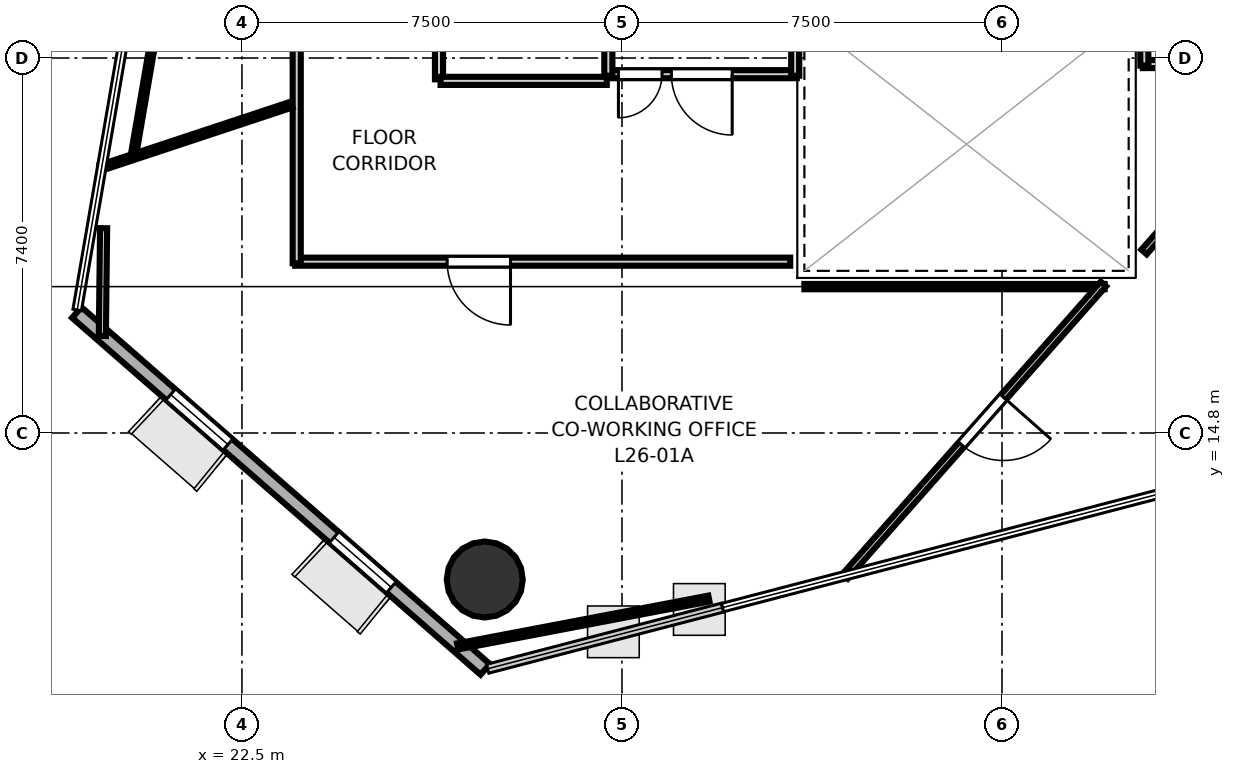
"""IFC4 building model, lengths in metres.
Left out: names, types, materials, properties, quantities, classifications, styles, units other than length and angle.
Written with IfcOpenShell. Run it as: python <this file> out.ifc"""

import sys

from ifc_helpers import new_model, si_unit, direction, frame, frame_2d, origin, origin_2d, place, context, subcontext, project, spatial, rectangle, hollow_circle, extrude, element, fill, save


model = new_model("IFC4")
c1 = context("Model", 3, precision=1e-05, world=origin(), true_north=direction((0.0, 1.0)))
c2 = subcontext(c1, "Body", "Model", "MODEL_VIEW")
j1 = project(units=[si_unit("LENGTHUNIT", "METRE"), si_unit("PLANEANGLEUNIT", "RADIAN")], contexts=[c1])
p1 = place(None, origin())
s1 = spatial("IfcSite", under=j1, at=p1, CompositionType="ELEMENT")
p2 = place(p1, origin())
s2 = spatial("IfcBuilding", under=s1, at=p2, CompositionType="ELEMENT")
p3 = place(p2, frame((0.0, 0.0, 105.2)))
s3 = spatial("IfcBuildingStorey", under=s2, at=p3, CompositionType="ELEMENT", Elevation=105.2)
p4 = place(p3, frame((27.292, 11.909, 0.0), z_axis=(0.0, 0.0, 1.0), x_axis=(1.0, 0.0, 0.0)))
e1 = element("IfcColumn", 1, at=p4, inside=s3, PredefinedType="COLUMN", context=c2, shape_type="SweptSolid", body=[
    extrude(hollow_circle(Radius=0.75, WallThickness=0.036, at=origin_2d()), origin(), (0.0, 0.0, 1.0), 3.7),
])
p5 = place(p3, frame((19.24, 17.179, 0.0), z_axis=(0.0, 0.0, 1.0), x_axis=(0.753037088213, -0.657978072413, 0.0)))
e2 = element("IfcWall", 2, at=p5, inside=s3, PredefinedType="SOLIDWALL", context=c2, shape_type="SweptSolid", body=[
    extrude(rectangle(XDim=10.705, YDim=0.28, at=frame_2d((5.352, 0.0))), origin(), (0.0, 0.0, 1.0), 3.52),
])
p6 = place(p5, frame((2.461, 0.0, 0.85)))
e3 = element("IfcOpeningElement", 3, at=p6, cuts=e2, PredefinedType="OPENING", context=c2, shape_type="SweptSolid", body=[
    extrude(rectangle(XDim=1.5, YDim=2.1, at=frame_2d((0.75, 1.05))), frame((0.0, 0.15, 0.0), z_axis=(0.0, -1.0, 0.0), x_axis=(1.0, 0.0, 0.0)), (0.0, 0.0, 1.0), 0.3),
])
p7 = place(p5, frame((6.743, 0.0, 0.85)))
e4 = element("IfcOpeningElement", 4, at=p7, cuts=e2, PredefinedType="OPENING", context=c2, shape_type="SweptSolid", body=[
    extrude(rectangle(XDim=1.5, YDim=2.1, at=frame_2d((0.75, 1.05))), frame((0.0, 0.15, 0.0), z_axis=(0.0, -1.0, 0.0), x_axis=(1.0, 0.0, 0.0)), (0.0, 0.0, 1.0), 0.3),
])
p8 = place(p3, frame((33.45, 21.881, 0.0), z_axis=(0.0, 0.0, 1.0), x_axis=(-1.0, 0.0, 0.0)))
e5 = element("IfcWall", 5, at=p8, inside=s3, PredefinedType="PARTITIONING", context=c2, shape_type="SweptSolid", body=[
    extrude(rectangle(XDim=3.75, YDim=0.16, at=frame_2d((1.875, 0.0))), origin(), (0.0, 0.0, 1.0), 2.84),
])
p9 = place(p8, frame((1.275, 0.0, 0.0)))
e6 = element("IfcOpeningElement", 6, at=p9, cuts=e5, PredefinedType="OPENING", context=c2, shape_type="SweptSolid", body=[
    extrude(rectangle(XDim=1.2, YDim=2.15, at=frame_2d((0.6, 1.075))), frame((0.0, 0.09, 0.0), z_axis=(0.0, -1.0, 0.0), x_axis=(1.0, 0.0, 0.0)), (0.0, 0.0, 1.0), 0.18),
])
p10 = place(p8, frame((2.66, 0.0, 0.0)))
e7 = element("IfcOpeningElement", 7, at=p10, cuts=e5, PredefinedType="OPENING", context=c2, shape_type="SweptSolid", body=[
    extrude(rectangle(XDim=0.86, YDim=2.05, at=frame_2d((0.43, 1.025))), frame((0.0, 0.09, 0.0), z_axis=(0.0, -1.0, 0.0), x_axis=(1.0, 0.0, 0.0)), (0.0, 0.0, 1.0), 0.18),
])
for number, where, z_axis, x_axis in (
    (8, (29.731, 21.85, 0.0), (0.0, 0.0, 1.0), (0.0, 1.0, 0.0)),
    (9, (33.419, 24.442, 0.0), (0.0, 0.0, 1.0), (0.0, -1.0, 0.0)),
):
    element("IfcWall", number, at=place(p3, frame(where, z_axis=z_axis, x_axis=x_axis)), inside=s3, PredefinedType="PARTITIONING", context=c2, shape_type="SweptSolid", body=[
        extrude(rectangle(XDim=2.592, YDim=0.16, at=frame_2d((1.296, 0.0))), origin(), (0.0, 0.0, 1.0), 2.84),
    ])
p11 = place(p3, frame((41.36, 22.081, 0.0), z_axis=(0.0, 0.0, 1.0), x_axis=(-1.0, 0.0, 0.0)))
e10 = element("IfcWall", 10, at=p11, inside=s3, PredefinedType="PARTITIONING", context=c2, shape_type="SweptSolid", body=[
    extrude(rectangle(XDim=1.08, YDim=0.16, at=frame_2d((0.54, 0.0))), origin(), (0.0, 0.0, 1.0), 2.84),
])
p12 = place(p3, frame((40.311, 22.05, 0.0), z_axis=(0.0, 0.0, 1.0), x_axis=(-0.011836292006, 0.999929948642, 0.0)))
e11 = element("IfcWall", 11, at=p12, inside=s3, PredefinedType="PARTITIONING", context=c2, shape_type="SweptSolid", body=[
    extrude(rectangle(XDim=1.031, YDim=0.16, at=frame_2d((0.516, 0.0))), origin(), (0.0, 0.0, 1.0), 2.84),
])
p13 = place(p3, frame((26.389, 24.531, 0.0), z_axis=(0.0, 0.0, 1.0), x_axis=(0.0, -1.0, 0.0)))
e12 = element("IfcWall", 12, at=p13, inside=s3, PredefinedType="PARTITIONING", context=c2, shape_type="SweptSolid", body=[
    extrude(rectangle(XDim=2.75, YDim=0.16, at=frame_2d((1.375, 0.0))), origin(), (0.0, 0.0, 1.0), 2.84),
])
p14 = place(p3, frame((26.42, 21.749, 0.0), z_axis=(0.0, 0.0, 1.0), x_axis=(1.0, 0.0, 0.0)))
e13 = element("IfcWall", 13, at=p14, inside=s3, PredefinedType="PARTITIONING", context=c2, shape_type="SweptSolid", body=[
    extrude(rectangle(XDim=3.28, YDim=0.16, at=frame_2d((1.64, 0.0))), origin(), (0.0, 0.0, 1.0), 2.84),
])
p15 = place(p3, frame((33.32, 18.181, 0.0), z_axis=(0.0, 0.0, 1.0), x_axis=(-1.0, 0.0, 0.0)))
e14 = element("IfcWall", 14, at=p15, inside=s3, PredefinedType="PARTITIONING", context=c2, shape_type="SweptSolid", body=[
    extrude(rectangle(XDim=9.77, YDim=0.16, at=frame_2d((4.885, 0.0))), origin(), (0.0, 0.0, 1.0), 2.84),
])
p16 = place(p15, frame((5.52, 0.0, 0.0)))
e15 = element("IfcOpeningElement", 15, at=p16, cuts=e14, PredefinedType="OPENING", context=c2, shape_type="SweptSolid", body=[
    extrude(rectangle(XDim=1.25, YDim=2.2, at=frame_2d((0.625, 1.1))), frame((0.0, 0.09, 0.0), z_axis=(0.0, -1.0, 0.0), x_axis=(1.0, 0.0, 0.0)), (0.0, 0.0, 1.0), 0.18),
])
p17 = place(p3, frame((23.581, 18.15, 0.0), z_axis=(0.0, 0.0, 1.0), x_axis=(0.0, 1.0, 0.0)))
e16 = element("IfcWall", 16, at=p17, inside=s3, PredefinedType="PARTITIONING", context=c2, shape_type="SweptSolid", body=[
    extrude(rectangle(XDim=8.575, YDim=0.16, at=frame_2d((4.288, 0.0))), origin(), (0.0, 0.0, 1.0), 2.84),
])
p18 = place(p3, frame((33.6, 17.689, 0.0), z_axis=(0.0, 0.0, 1.0), x_axis=(1.0, 0.0, 0.0)))
e17 = element("IfcWall", 17, at=p18, inside=s3, PredefinedType="PARTITIONING", context=c2, shape_type="SweptSolid", body=[
    extrude(rectangle(XDim=5.925, YDim=0.105, at=frame_2d((2.962, 0.0))), origin(), (0.0, 0.0, 1.0), 2.84),
])
p19 = place(p3, frame((39.502, 17.74, 0.0), z_axis=(0.0, 0.0, 1.0), x_axis=(-0.662230930848, -0.749299802635, 0.0)))
e18 = element("IfcWall", 18, at=p19, inside=s3, PredefinedType="PARTITIONING", context=c2, shape_type="SweptSolid", body=[
    extrude(rectangle(XDim=7.697, YDim=0.14, at=frame_2d((3.849, 0.0))), origin(), (0.0, 0.0, 1.0), 2.84),
])
p20 = place(p19, frame((2.98, 0.0, 0.0)))
e19 = element("IfcOpeningElement", 19, at=p20, cuts=e18, PredefinedType="OPENING", context=c2, shape_type="SweptSolid", body=[
    extrude(rectangle(XDim=1.25, YDim=2.2, at=frame_2d((0.625, 1.1))), frame((0.0, 0.08, 0.0), z_axis=(0.0, -1.0, 0.0), x_axis=(1.0, 0.0, 0.0)), (0.0, 0.0, 1.0), 0.16),
])
p21 = place(p3, frame((31.716, 11.532, 0.0), z_axis=(0.0, 0.0, 1.0), x_axis=(-0.982373684586, -0.186927643311, 0.0)))
e20 = element("IfcWall", 20, at=p21, inside=s3, PredefinedType="PARTITIONING", context=c2, shape_type="SweptSolid", body=[
    extrude(rectangle(XDim=5.048, YDim=0.12, at=frame_2d((2.524, 0.0))), origin(), (0.0, 0.0, 1.0), 2.84),
])
p22 = place(p3, frame((19.745, 16.715, 0.0), z_axis=(0.0, 0.0, 1.0), x_axis=(0.011705843153, 0.999931484271, 0.0)))
e21 = element("IfcWall", 21, at=p22, inside=s3, PredefinedType="PARTITIONING", context=c2, shape_type="SweptSolid", body=[
    extrude(rectangle(XDim=2.127, YDim=0.14, at=frame_2d((1.064, 0.0))), origin(), (0.0, 0.0, 1.0), 2.84),
])
p23 = place(p3, frame((19.713, 20.034, 0.0), z_axis=(0.0, 0.0, 1.0), x_axis=(0.949321292103, 0.314307308793, 0.0)))
e22 = element("IfcWall", 22, at=p23, inside=s3, PredefinedType="PARTITIONING", context=c2, shape_type="SweptSolid", body=[
    extrude(rectangle(XDim=3.968, YDim=0.12, at=frame_2d((1.984, 0.0))), origin(), (0.0, 0.0, 1.0), 2.84),
])
p24 = place(p3, frame((40.303, 18.372, 0.0), z_axis=(0.0, 0.0, 1.0), x_axis=(0.662221894186, 0.749307789136, 0.0)))
e23 = element("IfcWall", 23, at=p24, inside=s3, PredefinedType="PARTITIONING", context=c2, shape_type="SweptSolid", body=[
    extrude(rectangle(XDim=4.895, YDim=0.14, at=frame_2d((2.447, 0.0))), origin(), (0.0, 0.0, 1.0), 2.84),
])
p25 = place(p3, frame((20.371, 20.358, 0.0), z_axis=(0.0, 0.0, 1.0), x_axis=(0.169525939527, 0.985525725604, 0.0)))
e24 = element("IfcWall", 24, at=p25, inside=s3, PredefinedType="PARTITIONING", context=c2, shape_type="SweptSolid", body=[
    extrude(rectangle(XDim=15.044, YDim=0.105, at=frame_2d((7.522, 0.0))), origin(), (0.0, 0.0, 1.0), 2.84),
])
p26 = place(p9, origin())
e25 = element("IfcDoor", 25, at=p26, inside=s3, OperationType="SINGLE_SWING_LEFT", PredefinedType="DOOR", context=c2, shape_type="SweptSolid", body=[
    extrude(rectangle(XDim=1.2, YDim=2.15, at=frame_2d((0.6, 1.075))), frame((0.0, 0.025, 0.0), z_axis=(0.0, -1.0, 0.0), x_axis=(1.0, 0.0, 0.0)), (0.0, 0.0, 1.0), 0.05),
])
fill(e6, e25)
p27 = place(p10, origin())
e26 = element("IfcDoor", 26, at=p27, inside=s3, OperationType="SINGLE_SWING_RIGHT", PredefinedType="DOOR", context=c2, shape_type="SweptSolid", body=[
    extrude(rectangle(XDim=0.86, YDim=2.05, at=frame_2d((0.43, 1.025))), frame((0.0, 0.025, 0.0), z_axis=(0.0, -1.0, 0.0), x_axis=(1.0, 0.0, 0.0)), (0.0, 0.0, 1.0), 0.05),
])
fill(e7, e26)
p28 = place(p16, origin())
e27 = element("IfcDoor", 27, at=p28, inside=s3, OperationType="SINGLE_SWING_LEFT", PredefinedType="DOOR", context=c2, shape_type="SweptSolid", body=[
    extrude(rectangle(XDim=1.25, YDim=2.2, at=frame_2d((0.625, 1.1))), frame((0.0, 0.025, 0.0), z_axis=(0.0, -1.0, 0.0), x_axis=(1.0, 0.0, 0.0)), (0.0, 0.0, 1.0), 0.05),
])
fill(e15, e27)
p29 = place(p20, origin())
e28 = element("IfcDoor", 28, at=p29, inside=s3, OperationType="SINGLE_SWING_LEFT", PredefinedType="DOOR", context=c2, shape_type="SweptSolid", body=[
    extrude(rectangle(XDim=1.25, YDim=2.2, at=frame_2d((0.625, 1.1))), frame((0.0, 0.025, 0.0), z_axis=(0.0, -1.0, 0.0), x_axis=(1.0, 0.0, 0.0)), (0.0, 0.0, 1.0), 0.05),
])
fill(e19, e28)
p30 = place(p6, origin())
e29 = element("IfcWindow", 29, at=p30, inside=s3, PartitioningType="SINGLE_PANEL", PredefinedType="WINDOW", context=c2, shape_type="SweptSolid", body=[
    extrude(rectangle(XDim=1.5, YDim=2.1, at=frame_2d((0.75, 1.05))), frame((0.0, 0.03, 0.0), z_axis=(0.0, -1.0, 0.0), x_axis=(1.0, 0.0, 0.0)), (0.0, 0.0, 1.0), 0.06),
])
fill(e3, e29)
p31 = place(p7, origin())
e30 = element("IfcWindow", 30, at=p31, inside=s3, PartitioningType="SINGLE_PANEL", PredefinedType="WINDOW", context=c2, shape_type="SweptSolid", body=[
    extrude(rectangle(XDim=1.5, YDim=2.1, at=frame_2d((0.75, 1.05))), frame((0.0, 0.03, 0.0), z_axis=(0.0, -1.0, 0.0), x_axis=(1.0, 0.0, 0.0)), (0.0, 0.0, 1.0), 0.06),
])
fill(e4, e30)
save(model, sys.argv[1])
